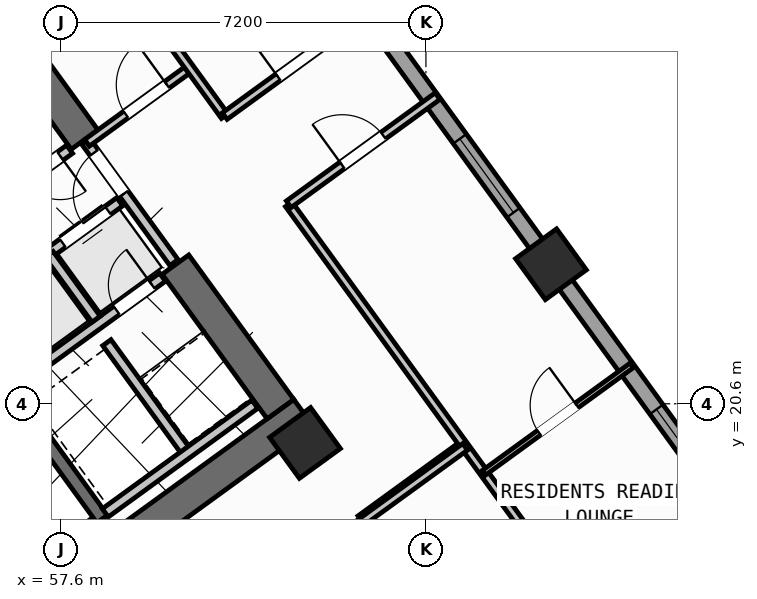
"""IFC4 building model, lengths in metres.
Left out: names, types, materials, properties, quantities, classifications, styles, units other than length and angle.
Written with IfcOpenShell. Run it as: python <this file> out.ifc"""

import sys

from ifc_helpers import new_model, si_unit, direction, frame, frame_2d, origin, origin_2d, place, context, subcontext, project, spatial, rectangle, hollow_rectangle, extrude, source, transform, mapped, element, fill, save


model = new_model("IFC4")
c1 = context("Model", 3, precision=1e-05, world=origin(), true_north=direction((0.0, 1.0)))
c2 = subcontext(c1, "Body", "Model", "MODEL_VIEW")
j1 = project(units=[si_unit("LENGTHUNIT", "METRE"), si_unit("PLANEANGLEUNIT", "RADIAN")], contexts=[c1])
p1 = place(None, origin())
s1 = spatial("IfcSite", under=j1, at=p1, CompositionType="ELEMENT")
p2 = place(p1, origin())
s2 = spatial("IfcBuilding", under=s1, at=p2, CompositionType="ELEMENT")
p3 = place(p2, frame((0.0, 0.0, 27.6)))
s3 = spatial("IfcBuildingStorey", under=s2, at=p3, CompositionType="ELEMENT", Elevation=27.6)
p4 = place(p3, frame((52.318, 13.11, 0.0), z_axis=(0.0, 0.0, 1.0), x_axis=(0.809019445368, 0.587781878776, 0.0)))
e1 = element("IfcWall", 1, at=p4, inside=s3, PredefinedType="SHEAR", context=c2, shape_type="SweptSolid", body=[
    extrude(rectangle(XDim=12.44, YDim=0.65, at=frame_2d((6.22, 0.0))), origin(), (0.0, 0.0, 1.0), 3.35),
])
p5 = place(p3, frame((61.929, 20.494, 0.0), z_axis=(0.0, 0.0, 1.0), x_axis=(-0.58782982593, 0.808984607855, 0.0)))
e2 = element("IfcWall", 2, at=p5, inside=s3, PredefinedType="SHEAR", context=c2, shape_type="SweptSolid", body=[
    extrude(rectangle(XDim=3.525, YDim=0.65, at=frame_2d((1.762, 0.0))), origin(), (0.0, 0.0, 1.0), 3.35),
])
p6 = place(p3, frame((58.064, 25.813, 0.0), z_axis=(0.0, 0.0, 1.0), x_axis=(-0.58777996584, 0.809020835181, 0.0)))
e3 = element("IfcWall", 3, at=p6, inside=s3, PredefinedType="SHEAR", context=c2, shape_type="SweptSolid", body=[
    extrude(rectangle(XDim=6.375, YDim=0.65, at=frame_2d((3.188, 0.0))), origin(), (0.0, 0.0, 1.0), 3.35),
])
m1 = source(origin(), c2, "Body", "SweptSolid", [
    extrude(hollow_rectangle(XDim=1.0, YDim=1.0, WallThickness=0.04, at=origin_2d()), origin(), (0.0, 0.0, 1.0), 3.6),
])
for number, where, z_axis, x_axis in (
    (4, (62.414, 19.827, 0.0), (0.0, 0.0, 1.0), (0.809, 0.588, 0.0)),
    (5, (67.268, 23.354, 0.0), (0.0, 0.0, 1.0), (0.809, 0.588, 0.0)),
):
    element("IfcColumn", number, at=place(p3, frame(where, z_axis=z_axis, x_axis=x_axis)), inside=s3, PredefinedType="COLUMN", context=c2, shape_type="MappedRepresentation", body=[
        mapped(m1, transform((0.0, 0.0, 0.0), scale=1.0)),
    ])
p7 = place(p3, frame((43.938, 25.192, 0.0), z_axis=(0.0, 0.0, 1.0), x_axis=(0.809016324578, 0.587786174187, 0.0)))
e6 = element("IfcWall", 6, at=p7, inside=s3, PredefinedType="STANDARD", context=c2, shape_type="SweptSolid", body=[
    extrude(rectangle(XDim=17.587, YDim=0.32, at=frame_2d((8.794, 0.0))), origin(), (0.0, 0.0, 1.0), 3.35),
])
p8 = place(p7, frame((14.914, 0.0, 0.0)))
e7 = element("IfcOpeningElement", 7, at=p8, cuts=e6, PredefinedType="OPENING", context=c2, shape_type="SweptSolid", body=[
    extrude(rectangle(XDim=1.05, YDim=2.15, at=frame_2d((0.525, 1.075))), frame((0.0, 0.17, 0.0), z_axis=(0.0, -1.0, 0.0), x_axis=(1.0, 0.0, 0.0)), (0.0, 0.0, 1.0), 0.34),
])
p9 = place(p7, frame((2.169, 0.0, 0.8)))
e8 = element("IfcOpeningElement", 8, at=p9, cuts=e6, PredefinedType="OPENING", context=c2, shape_type="SweptSolid", body=[
    extrude(rectangle(XDim=2.1, YDim=1.55, at=frame_2d((1.05, 0.775))), frame((0.0, 0.17, 0.0), z_axis=(0.0, -1.0, 0.0), x_axis=(1.0, 0.0, 0.0)), (0.0, 0.0, 1.0), 0.34),
])
p10 = place(p7, frame((7.319, 0.0, 0.8)))
e9 = element("IfcOpeningElement", 9, at=p10, cuts=e6, PredefinedType="OPENING", context=c2, shape_type="SweptSolid", body=[
    extrude(rectangle(XDim=2.1, YDim=1.55, at=frame_2d((1.05, 0.775))), frame((0.0, 0.17, 0.0), z_axis=(0.0, -1.0, 0.0), x_axis=(1.0, 0.0, 0.0)), (0.0, 0.0, 1.0), 0.34),
])
p11 = place(p3, frame((58.455, 35.484, 0.0), z_axis=(0.0, 0.0, 1.0), x_axis=(0.587783625747, -0.809018176127, 0.0)))
e10 = element("IfcWall", 10, at=p11, inside=s3, PredefinedType="STANDARD", context=c2, shape_type="SweptSolid", body=[
    extrude(rectangle(XDim=21.587, YDim=0.32, at=frame_2d((10.794, 0.0))), origin(), (0.0, 0.0, 1.0), 2.725),
])
p12 = place(p11, frame((2.994, 0.0, 0.8)))
e11 = element("IfcOpeningElement", 11, at=p12, cuts=e10, PredefinedType="OPENING", context=c2, shape_type="SweptSolid", body=[
    extrude(rectangle(XDim=2.1, YDim=1.55, at=frame_2d((1.05, 0.775))), frame((0.0, 0.17, 0.0), z_axis=(0.0, -1.0, 0.0), x_axis=(1.0, 0.0, 0.0)), (0.0, 0.0, 1.0), 0.34),
])
p13 = place(p11, frame((11.934, 0.0, 0.85)))
e12 = element("IfcOpeningElement", 12, at=p13, cuts=e10, PredefinedType="OPENING", context=c2, shape_type="SweptSolid", body=[
    extrude(rectangle(XDim=1.8, YDim=1.5, at=frame_2d((0.9, 0.75))), frame((0.0, 0.17, 0.0), z_axis=(0.0, -1.0, 0.0), x_axis=(1.0, 0.0, 0.0)), (0.0, 0.0, 1.0), 0.34),
])
p14 = place(p11, frame((18.535, 0.0, 0.85)))
e13 = element("IfcOpeningElement", 13, at=p14, cuts=e10, PredefinedType="OPENING", context=c2, shape_type="SweptSolid", body=[
    extrude(rectangle(XDim=1.5, YDim=1.5, at=frame_2d((0.75, 0.75))), frame((0.0, 0.17, 0.0), z_axis=(0.0, -1.0, 0.0), x_axis=(1.0, 0.0, 0.0)), (0.0, 0.0, 1.0), 0.34),
])
p15 = place(p3, frame((52.472, 14.013, 0.0), z_axis=(0.0, 0.0, 1.0), x_axis=(0.809028366311, 0.587769599847, 0.0)))
e14 = element("IfcWall", 14, at=p15, inside=s3, PredefinedType="SHEAR", context=c2, shape_type="SweptSolid", body=[
    extrude(rectangle(XDim=7.33, YDim=0.26, at=frame_2d((3.665, 0.0))), origin(), (0.0, 0.0, 1.0), 3.35),
])
p16 = place(p3, frame((58.41, 18.327, 0.0), z_axis=(0.0, 0.0, 1.0), x_axis=(-0.58776738483, 0.809029975545, 0.0)))
e15 = element("IfcWall", 15, at=p16, inside=s3, PredefinedType="SHEAR", context=c2, shape_type="SweptSolid", body=[
    extrude(rectangle(XDim=3.16, YDim=0.26, at=frame_2d((1.58, 0.0))), origin(), (0.0, 0.0, 1.0), 3.35),
])
p17 = place(p3, frame((56.553, 20.884, 0.0), z_axis=(0.0, 0.0, 1.0), x_axis=(0.809035789462, 0.587759382205, 0.0)))
e16 = element("IfcWall", 16, at=p17, inside=s3, PredefinedType="STANDARD", context=c2, shape_type="SweptSolid", body=[
    extrude(rectangle(XDim=3.768, YDim=0.2, at=frame_2d((1.884, 0.0))), origin(), (0.0, 0.0, 1.0), 3.34),
])
p18 = place(p17, frame((2.65, 0.0, 0.0)))
e17 = element("IfcOpeningElement", 17, at=p18, cuts=e16, PredefinedType="OPENING", context=c2, shape_type="SweptSolid", body=[
    extrude(rectangle(XDim=0.86, YDim=2.05, at=frame_2d((0.43, 1.025))), frame((0.0, 0.11, 0.0), z_axis=(0.0, -1.0, 0.0), x_axis=(1.0, 0.0, 0.0)), (0.0, 0.0, 1.0), 0.22),
])
p19 = place(p3, frame((54.421, 21.436, 0.0), z_axis=(0.0, 0.0, 1.0), x_axis=(0.809013710463, 0.587789772183, 0.0)))
e18 = element("IfcWall", 18, at=p19, inside=s3, PredefinedType="STANDARD", context=c2, shape_type="SweptSolid", body=[
    extrude(rectangle(XDim=5.36, YDim=0.2, at=frame_2d((2.68, 0.0))), origin(), (0.0, 0.0, 1.0), 3.34),
])
p20 = place(p19, frame((0.37, 0.0, 0.0)))
e19 = element("IfcOpeningElement", 19, at=p20, cuts=e18, PredefinedType="OPENING", context=c2, shape_type="SweptSolid", body=[
    extrude(rectangle(XDim=1.1, YDim=2.15, at=frame_2d((0.55, 1.075))), frame((0.0, 0.11, 0.0), z_axis=(0.0, -1.0, 0.0), x_axis=(1.0, 0.0, 0.0)), (0.0, 0.0, 1.0), 0.22),
])
p21 = place(p19, frame((2.17, 0.0, 0.0)))
e20 = element("IfcOpeningElement", 20, at=p21, cuts=e18, PredefinedType="OPENING", context=c2, shape_type="SweptSolid", body=[
    extrude(rectangle(XDim=1.1, YDim=2.15, at=frame_2d((0.55, 1.075))), frame((0.0, 0.11, 0.0), z_axis=(0.0, -1.0, 0.0), x_axis=(1.0, 0.0, 0.0)), (0.0, 0.0, 1.0), 0.22),
])
p22 = place(p19, frame((3.97, 0.0, 0.0)))
e21 = element("IfcOpeningElement", 21, at=p22, cuts=e18, PredefinedType="OPENING", context=c2, shape_type="SweptSolid", body=[
    extrude(rectangle(XDim=1.1, YDim=2.15, at=frame_2d((0.55, 1.075))), frame((0.0, 0.11, 0.0), z_axis=(0.0, -1.0, 0.0), x_axis=(1.0, 0.0, 0.0)), (0.0, 0.0, 1.0), 0.22),
])
p23 = place(p3, frame((58.29, 22.27, 0.0), z_axis=(0.0, 0.0, 1.0), x_axis=(-0.587840865826, 0.808976585857, 0.0)))
e22 = element("IfcWall", 22, at=p23, inside=s3, PredefinedType="STANDARD", context=c2, shape_type="SweptSolid", body=[
    extrude(rectangle(XDim=1.58, YDim=0.2, at=frame_2d((0.79, 0.0))), origin(), (0.0, 0.0, 1.0), 3.34),
])
p24 = place(p3, frame((60.067, 19.655, 0.0), z_axis=(0.0, 0.0, 1.0), x_axis=(-0.587800520745, 0.809005900975, 0.0)))
e23 = element("IfcWall", 23, at=p24, inside=s3, PredefinedType="STANDARD", context=c2, shape_type="SweptSolid", body=[
    extrude(rectangle(XDim=2.66, YDim=0.2, at=frame_2d((1.33, 0.0))), origin(), (0.0, 0.0, 1.0), 3.34),
])
p25 = place(p3, frame((58.472, 18.447, 0.0), z_axis=(0.0, 0.0, 1.0), x_axis=(0.809022487728, 0.587777691266, 0.0)))
e24 = element("IfcWall", 24, at=p25, inside=s3, PredefinedType="STANDARD", context=c2, shape_type="SweptSolid", body=[
    extrude(rectangle(XDim=3.648, YDim=0.2, at=frame_2d((1.824, 0.0))), origin(), (0.0, 0.0, 1.0), 3.34),
])
p26 = place(p3, frame((53.425, 22.468, 0.0), z_axis=(0.0, 0.0, 1.0), x_axis=(0.80902705128, 0.587771409902, 0.0)))
e25 = element("IfcWall", 25, at=p26, inside=s3, PredefinedType="STANDARD", context=c2, shape_type="SweptSolid", body=[
    extrude(rectangle(XDim=5.368, YDim=0.2, at=frame_2d((2.684, 0.0))), origin(), (0.0, 0.0, 1.0), 3.34),
])
p27 = place(p26, frame((4.28, 0.0, 0.0)))
e26 = element("IfcOpeningElement", 26, at=p27, cuts=e25, PredefinedType="OPENING", context=c2, shape_type="SweptSolid", body=[
    extrude(rectangle(XDim=0.86, YDim=2.05, at=frame_2d((0.43, 1.025))), frame((0.0, 0.11, 0.0), z_axis=(0.0, -1.0, 0.0), x_axis=(1.0, 0.0, 0.0)), (0.0, 0.0, 1.0), 0.22),
])
p28 = place(p26, frame((1.45, 0.0, 0.0)))
e27 = element("IfcOpeningElement", 27, at=p28, cuts=e25, PredefinedType="OPENING", context=c2, shape_type="SweptSolid", body=[
    extrude(rectangle(XDim=0.86, YDim=2.05, at=frame_2d((0.43, 1.025))), frame((0.0, 0.11, 0.0), z_axis=(0.0, -1.0, 0.0), x_axis=(1.0, 0.0, 0.0)), (0.0, 0.0, 1.0), 0.22),
])
p29 = place(p3, frame((59.827, 23.386, 0.0), z_axis=(0.0, 0.0, 1.0), x_axis=(-0.587803840107, 0.809003489211, 0.0)))
e28 = element("IfcWall", 28, at=p29, inside=s3, PredefinedType="STANDARD", context=c2, shape_type="SweptSolid", body=[
    extrude(rectangle(XDim=2.96, YDim=0.2, at=frame_2d((1.48, 0.0))), origin(), (0.0, 0.0, 1.0), 3.34),
])
p30 = place(p29, frame((1.68, 0.0, 0.0)))
e29 = element("IfcOpeningElement", 29, at=p30, cuts=e28, PredefinedType="OPENING", context=c2, shape_type="SweptSolid", body=[
    extrude(rectangle(XDim=1.0, YDim=2.1, at=frame_2d((0.5, 1.05))), frame((0.0, 0.11, 0.0), z_axis=(0.0, -1.0, 0.0), x_axis=(1.0, 0.0, 0.0)), (0.0, 0.0, 1.0), 0.22),
])
p31 = place(p3, frame((63.507, 18.322, 0.0), z_axis=(0.0, 0.0, 1.0), x_axis=(0.809034604122, 0.587761013791, 0.0)))
e30 = element("IfcWall", 30, at=p31, inside=s3, PredefinedType="PARTITIONING", context=c2, shape_type="SweptSolid", body=[
    extrude(rectangle(XDim=2.51, YDim=0.16, at=frame_2d((1.255, 0.0))), origin(), (0.0, 0.0, 1.0), 3.34),
])
p32 = place(p3, frame((58.111, 25.749, 0.0), z_axis=(0.0, 0.0, 1.0), x_axis=(0.809000999347, 0.58780726693, 0.0)))
e31 = element("IfcWall", 31, at=p32, inside=s3, PredefinedType="PARTITIONING", context=c2, shape_type="SweptSolid", body=[
    extrude(rectangle(XDim=2.51, YDim=0.16, at=frame_2d((1.255, 0.0))), origin(), (0.0, 0.0, 1.0), 2.725),
])
p33 = place(p32, frame((0.95, 0.0, 0.0)))
e32 = element("IfcOpeningElement", 32, at=p33, cuts=e31, PredefinedType="OPENING", context=c2, shape_type="SweptSolid", body=[
    extrude(rectangle(XDim=1.0, YDim=2.1, at=frame_2d((0.5, 1.05))), frame((0.0, 0.09, 0.0), z_axis=(0.0, -1.0, 0.0), x_axis=(1.0, 0.0, 0.0)), (0.0, 0.0, 1.0), 0.18),
])
p34 = place(p3, frame((68.353, 15.922, 0.0), z_axis=(0.0, 0.0, 1.0), x_axis=(-0.587783168305, 0.809018508476, 0.0)))
e33 = element("IfcWall", 33, at=p34, inside=s3, PredefinedType="PARTITIONING", context=c2, shape_type="SweptSolid", body=[
    extrude(rectangle(XDim=10.65, YDim=0.16, at=frame_2d((5.325, 0.0))), origin(), (0.0, 0.0, 1.0), 3.34),
])
p35 = place(p3, frame((60.829, 26.278, 0.0), z_axis=(0.0, 0.0, 1.0), x_axis=(-0.587781800813, 0.80901950201, 0.0)))
e34 = element("IfcWall", 34, at=p35, inside=s3, PredefinedType="PARTITIONING", context=c2, shape_type="SweptSolid", body=[
    extrude(rectangle(XDim=8.9, YDim=0.16, at=frame_2d((4.45, 0.0))), origin(), (0.0, 0.0, 1.0), 3.34),
])
p36 = place(p3, frame((62.093, 24.538, 0.0), z_axis=(0.0, 0.0, 1.0), x_axis=(0.809035546126, 0.58775971715, 0.0)))
e35 = element("IfcWall", 35, at=p36, inside=s3, PredefinedType="PARTITIONING", context=c2, shape_type="SweptSolid", body=[
    extrude(rectangle(XDim=3.63, YDim=0.16, at=frame_2d((1.815, 0.0))), origin(), (0.0, 0.0, 1.0), 3.34),
])
p37 = place(p36, frame((1.305, 0.0, 0.0)))
e36 = element("IfcOpeningElement", 36, at=p37, cuts=e35, PredefinedType="OPENING", context=c2, shape_type="SweptSolid", body=[
    extrude(rectangle(XDim=1.0, YDim=2.1, at=frame_2d((0.5, 1.05))), frame((0.0, 0.09, 0.0), z_axis=(0.0, -1.0, 0.0), x_axis=(1.0, 0.0, 0.0)), (0.0, 0.0, 1.0), 0.18),
])
p38 = place(p3, frame((60.829, 26.278, 0.0), z_axis=(0.0, 0.0, 1.0), x_axis=(0.809003564202, 0.587803736896, 0.0)))
e37 = element("IfcWall", 37, at=p38, inside=s3, PredefinedType="PARTITIONING", context=c2, shape_type="SweptSolid", body=[
    extrude(rectangle(XDim=3.63, YDim=0.16, at=frame_2d((1.815, 0.0))), origin(), (0.0, 0.0, 1.0), 3.34),
])
p39 = place(p38, frame((1.305, 0.0, 0.0)))
e38 = element("IfcOpeningElement", 38, at=p39, cuts=e37, PredefinedType="OPENING", context=c2, shape_type="SweptSolid", body=[
    extrude(rectangle(XDim=1.0, YDim=2.1, at=frame_2d((0.5, 1.05))), frame((0.0, 0.09, 0.0), z_axis=(0.0, -1.0, 0.0), x_axis=(1.0, 0.0, 0.0)), (0.0, 0.0, 1.0), 0.18),
])
p40 = place(p3, frame((65.944, 19.238, 0.0), z_axis=(0.0, 0.0, 1.0), x_axis=(0.809013833588, 0.587789602718, 0.0)))
e39 = element("IfcWall", 39, at=p40, inside=s3, PredefinedType="PARTITIONING", context=c2, shape_type="SweptSolid", body=[
    extrude(rectangle(XDim=3.61, YDim=0.11, at=frame_2d((1.805, 0.0))), origin(), (0.0, 0.0, 1.0), 3.34),
])
p41 = place(p40, frame((1.345, 0.0, 0.0)))
e40 = element("IfcOpeningElement", 40, at=p41, cuts=e39, PredefinedType="OPENING", context=c2, shape_type="SweptSolid", body=[
    extrude(rectangle(XDim=0.92, YDim=2.08, at=frame_2d((0.46, 1.04))), frame((0.0, 0.065, 0.0), z_axis=(0.0, -1.0, 0.0), x_axis=(1.0, 0.0, 0.0)), (0.0, 0.0, 1.0), 0.13),
])
p42 = place(p3, frame((53.705, 11.126, 0.0), z_axis=(0.0, 0.0, 1.0), x_axis=(0.809014504436, 0.587788679384, 0.0)))
e41 = element("IfcWall", 41, at=p42, inside=s3, PredefinedType="PARTITIONING", context=c2, shape_type="SweptSolid", body=[
    extrude(rectangle(XDim=14.67, YDim=0.16, at=frame_2d((7.335, 0.0))), origin(), (0.0, 0.0, 1.0), 3.34),
])
p43 = place(p42, frame((10.2, 0.0, 0.0)))
e42 = element("IfcOpeningElement", 42, at=p43, cuts=e41, PredefinedType="OPENING", context=c2, shape_type="SweptSolid", body=[
    extrude(rectangle(XDim=1.0, YDim=2.1, at=frame_2d((0.5, 1.05))), frame((0.0, 0.09, 0.0), z_axis=(0.0, -1.0, 0.0), x_axis=(1.0, 0.0, 0.0)), (0.0, 0.0, 1.0), 0.18),
])
m2 = source(origin(), c2, "Body", "SweptSolid", [
    extrude(rectangle(XDim=1.8, YDim=1.5, at=frame_2d((0.9, 0.75))), frame((0.0, 0.03, 0.0), z_axis=(0.0, -1.0, 0.0), x_axis=(1.0, 0.0, 0.0)), (0.0, 0.0, 1.0), 0.06),
])
p44 = place(p13, origin())
e43 = element("IfcWindow", 43, at=p44, inside=s3, PartitioningType="SINGLE_PANEL", PredefinedType="WINDOW", context=c2, shape_type="MappedRepresentation", body=[
    mapped(m2, transform((0.0, 0.0, 0.0), scale=1.0)),
])
fill(e12, e43)
m3 = source(origin(), c2, "Body", "SweptSolid", [
    extrude(rectangle(XDim=1.5, YDim=1.5, at=frame_2d((0.75, 0.75))), frame((0.0, 0.03, 0.0), z_axis=(0.0, -1.0, 0.0), x_axis=(1.0, 0.0, 0.0)), (0.0, 0.0, 1.0), 0.06),
])
p45 = place(p14, origin())
e44 = element("IfcWindow", 44, at=p45, inside=s3, PartitioningType="SINGLE_PANEL", PredefinedType="WINDOW", context=c2, shape_type="MappedRepresentation", body=[
    mapped(m3, transform((0.0, 0.0, 0.0), scale=1.0)),
])
fill(e13, e44)
m4 = source(origin(), c2, "Body", "SweptSolid", [
    extrude(rectangle(XDim=1.1, YDim=2.15, at=frame_2d((0.55, 1.075))), frame((0.0, 0.025, 0.0), z_axis=(0.0, -1.0, 0.0), x_axis=(1.0, 0.0, 0.0)), (0.0, 0.0, 1.0), 0.05),
])
p46 = place(p22, origin())
e45 = element("IfcDoor", 45, at=p46, inside=s3, OperationType="DOUBLE_DOOR_SLIDING", PredefinedType="DOOR", context=c2, shape_type="MappedRepresentation", body=[
    mapped(m4, transform((0.0, 0.0, 0.0), scale=1.0)),
])
fill(e21, e45)
m5 = source(origin(), c2, "Body", "SweptSolid", [
    extrude(rectangle(XDim=0.86, YDim=2.05, at=frame_2d((0.43, 1.025))), frame((0.0, 0.025, 0.0), z_axis=(0.0, -1.0, 0.0), x_axis=(1.0, 0.0, 0.0)), (0.0, 0.0, 1.0), 0.05),
])
p47 = place(p18, origin())
e46 = element("IfcDoor", 46, at=p47, inside=s3, OperationType="SINGLE_SWING_RIGHT", PredefinedType="DOOR", context=c2, shape_type="MappedRepresentation", body=[
    mapped(m5, transform((0.0, 0.0, 0.0), scale=1.0)),
])
fill(e17, e46)
p48 = place(p27, frame((0.86, 0.0, 0.0), z_axis=(0.0, 0.0, 1.0), x_axis=(-1.0, 0.0, 0.0)))
e47 = element("IfcDoor", 47, at=p48, inside=s3, OperationType="SINGLE_SWING_LEFT", PredefinedType="DOOR", context=c2, shape_type="MappedRepresentation", body=[
    mapped(m5, transform((0.0, 0.0, 0.0), scale=1.0)),
])
fill(e26, e47)
m6 = source(origin(), c2, "Body", "SweptSolid", [
    extrude(rectangle(XDim=1.0, YDim=2.1, at=frame_2d((0.5, 1.05))), frame((0.0, 0.025, 0.0), z_axis=(0.0, -1.0, 0.0), x_axis=(1.0, 0.0, 0.0)), (0.0, 0.0, 1.0), 0.05),
])
p49 = place(p33, origin())
e48 = element("IfcDoor", 48, at=p49, inside=s3, OperationType="SINGLE_SWING_RIGHT", PredefinedType="DOOR", context=c2, shape_type="MappedRepresentation", body=[
    mapped(m6, transform((0.0, 0.0, 0.0), scale=1.0)),
])
fill(e32, e48)
p50 = place(p30, origin())
e49 = element("IfcDoor", 49, at=p50, inside=s3, OperationType="SINGLE_SWING_LEFT", PredefinedType="DOOR", context=c2, shape_type="MappedRepresentation", body=[
    mapped(m6, transform((0.0, 0.0, 0.0), scale=1.0)),
])
fill(e29, e49)
p51 = place(p39, origin())
e50 = element("IfcDoor", 50, at=p51, inside=s3, OperationType="SINGLE_SWING_LEFT", PredefinedType="DOOR", context=c2, shape_type="MappedRepresentation", body=[
    mapped(m6, transform((0.0, 0.0, 0.0), scale=1.0)),
])
fill(e38, e50)
p52 = place(p37, origin())
e51 = element("IfcDoor", 51, at=p52, inside=s3, OperationType="SINGLE_SWING_LEFT", PredefinedType="DOOR", context=c2, shape_type="MappedRepresentation", body=[
    mapped(m6, transform((0.0, 0.0, 0.0), scale=1.0)),
])
fill(e36, e51)
m7 = source(origin(), c2, "Body", "SweptSolid", [
    extrude(rectangle(XDim=0.92, YDim=2.08, at=frame_2d((0.46, 1.04))), frame((0.0, 0.025, 0.0), z_axis=(0.0, -1.0, 0.0), x_axis=(1.0, 0.0, 0.0)), (0.0, 0.0, 1.0), 0.05),
])
p53 = place(p41, origin())
e52 = element("IfcDoor", 52, at=p53, inside=s3, OperationType="SINGLE_SWING_RIGHT", PredefinedType="DOOR", context=c2, shape_type="MappedRepresentation", body=[
    mapped(m7, transform((0.0, 0.0, 0.0), scale=1.0)),
])
fill(e40, e52)
save(model, sys.argv[1])
